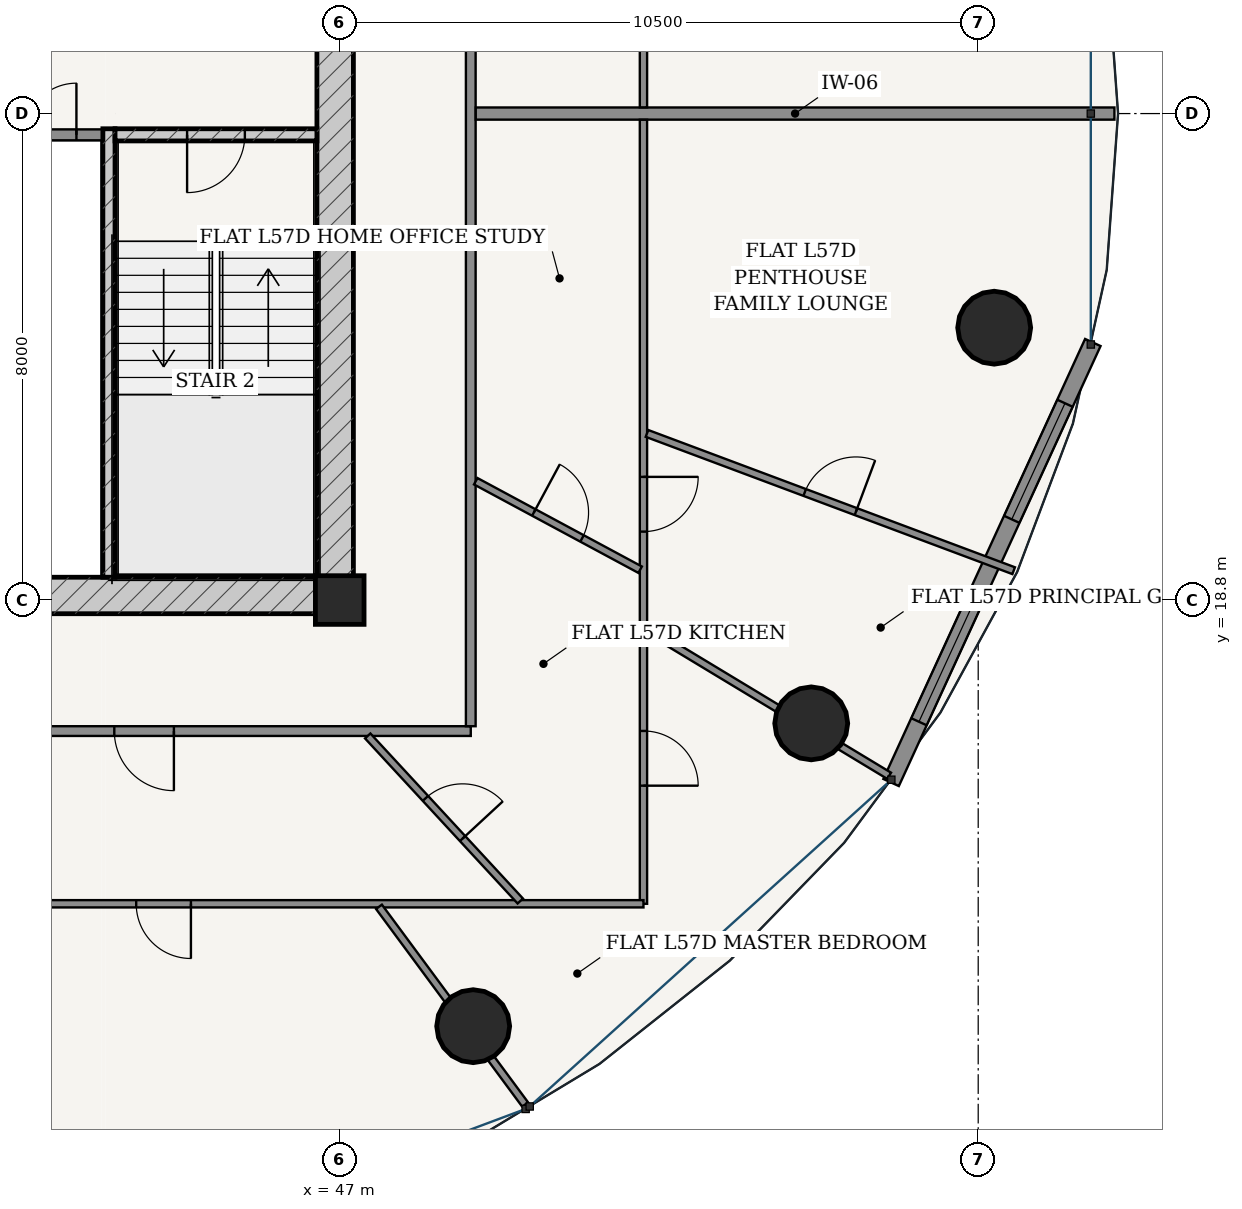
"""IFC4 building model, lengths in metres.
Left out: names, types, materials, properties, quantities, classifications, styles, units other than length and angle.
Written with IfcOpenShell. Run it as: python <this file> out.ifc"""

import sys

from ifc_helpers import new_model, si_unit, direction, frame, frame_2d, origin, origin_2d, place, context, subcontext, project, spatial, rectangle, hollow_circle, extrude, source, transform, mapped, element, fill, save


model = new_model("IFC4")
c1 = context("Model", 3, precision=1e-05, world=origin(), true_north=direction((-0.2419218956, 0.970295726276)))
c2 = subcontext(c1, "Body", "Model", "MODEL_VIEW")
j1 = project(units=[si_unit("LENGTHUNIT", "METRE"), si_unit("PLANEANGLEUNIT", "RADIAN")], contexts=[c1])
p1 = place(None, origin())
s1 = spatial("IfcSite", under=j1, at=p1, CompositionType="ELEMENT")
p2 = place(p1, origin())
s2 = spatial("IfcBuilding", under=s1, at=p2, CompositionType="ELEMENT")
p3 = place(p2, frame((0.0, 0.0, 217.1)))
s3 = spatial("IfcBuildingStorey", under=s2, at=p3, CompositionType="ELEMENT", Elevation=217.1)
p4 = place(p3, frame((47.0, 18.8, 0.0), z_axis=(0.0, 0.0, 1.0), x_axis=(1.0, 0.0, 0.0)))
e1 = element("IfcColumn", 1, at=p4, inside=s3, PredefinedType="COLUMN", context=c2, shape_type="SweptSolid", body=[
    extrude(rectangle(XDim=0.8, YDim=0.8, at=origin_2d()), origin(), (0.0, 0.0, 1.0), 3.7),
])
p5 = place(p3, frame((28.775, 18.875, 0.0), z_axis=(0.0, 0.0, 1.0), x_axis=(1.0, 0.0, 0.0)))
e2 = element("IfcWall", 2, at=p5, inside=s3, PredefinedType="SHEAR", context=c2, shape_type="SweptSolid", body=[
    extrude(rectangle(XDim=18.45, YDim=0.6, at=frame_2d((9.225, 0.0))), origin(), (0.0, 0.0, 1.0), 3.435),
])
p6 = place(p5, frame((7.46, 0.0, 0.0)))
e3 = element("IfcOpeningElement", 3, at=p6, cuts=e2, PredefinedType="OPENING", context=c2, shape_type="SweptSolid", body=[
    extrude(rectangle(XDim=0.85, YDim=2.1, at=frame_2d((0.425, 1.05))), frame((0.0, 0.31, 0.0), z_axis=(0.0, -1.0, 0.0), x_axis=(1.0, 0.0, 0.0)), (0.0, 0.0, 1.0), 0.62),
])
p7 = place(p5, frame((10.54, 0.0, 0.0)))
e4 = element("IfcOpeningElement", 4, at=p7, cuts=e2, PredefinedType="OPENING", context=c2, shape_type="SweptSolid", body=[
    extrude(rectangle(XDim=0.85, YDim=2.1, at=frame_2d((0.425, 1.05))), frame((0.0, 0.31, 0.0), z_axis=(0.0, -1.0, 0.0), x_axis=(1.0, 0.0, 0.0)), (0.0, 0.0, 1.0), 0.62),
])
p8 = place(p3, frame((46.925, 19.175, 0.0), z_axis=(0.0, 0.0, 1.0), x_axis=(0.0, 1.0, 0.0)))
e5 = element("IfcWall", 5, at=p8, inside=s3, PredefinedType="SHEAR", context=c2, shape_type="SweptSolid", body=[
    extrude(rectangle(XDim=15.25, YDim=0.6, at=frame_2d((7.625, 0.0))), origin(), (0.0, 0.0, 1.0), 3.435),
])
p9 = place(p8, frame((9.875, 0.0, 0.0)))
e6 = element("IfcOpeningElement", 6, at=p9, cuts=e5, PredefinedType="OPENING", context=c2, shape_type="SweptSolid", body=[
    extrude(rectangle(XDim=1.5, YDim=2.2, at=frame_2d((0.75, 1.1))), frame((0.0, 0.31, 0.0), z_axis=(0.0, -1.0, 0.0), x_axis=(1.0, 0.0, 0.0)), (0.0, 0.0, 1.0), 0.62),
])
p10 = place(p3, frame((43.205, 19.175, 0.0), z_axis=(0.0, 0.0, 1.0), x_axis=(0.0, 1.0, 0.0)))
e7 = element("IfcWall", 7, at=p10, inside=s3, PredefinedType="SOLIDWALL", context=c2, shape_type="SweptSolid", body=[
    extrude(rectangle(XDim=7.375, YDim=0.2, at=frame_2d((3.688, 0.0))), origin(), (0.0, 0.0, 1.0), 3.435),
])
p11 = place(p3, frame((43.305, 26.45, 0.0), z_axis=(0.0, 0.0, 1.0), x_axis=(1.0, 0.0, 0.0)))
e8 = element("IfcWall", 8, at=p11, inside=s3, PredefinedType="SOLIDWALL", context=c2, shape_type="SweptSolid", body=[
    extrude(rectangle(XDim=3.32, YDim=0.2, at=frame_2d((1.66, 0.0))), origin(), (0.0, 0.0, 1.0), 3.435),
])
p12 = place(p11, frame((1.185, 0.0, 0.0)))
e9 = element("IfcOpeningElement", 9, at=p12, cuts=e8, PredefinedType="OPENING", context=c2, shape_type="SweptSolid", body=[
    extrude(rectangle(XDim=0.95, YDim=2.15, at=frame_2d((0.475, 1.075))), frame((0.0, 0.11, 0.0), z_axis=(0.0, -1.0, 0.0), x_axis=(1.0, 0.0, 0.0)), (0.0, 0.0, 1.0), 0.22),
])
for number, where, z_axis, x_axis in (
    (10, (49.195, 11.792, 0.0), (0.0, 0.0, 1.0), (1.0, 0.0, 0.0)),
    (11, (54.754, 16.772, 0.0), (0.0, 0.0, 1.0), (1.0, 0.0, 0.0)),
    (12, (57.763, 23.279, 0.0), (0.0, 0.0, 1.0), (1.0, 0.0, 0.0)),
):
    element("IfcColumn", number, at=place(p3, frame(where, z_axis=z_axis, x_axis=x_axis)), inside=s3, PredefinedType="COLUMN", context=c2, shape_type="SweptSolid", body=[
        extrude(hollow_circle(Radius=0.6, WallThickness=0.038, at=origin_2d()), origin(), (0.0, 0.0, 1.0), 3.7),
    ])
p13 = place(p3, frame((56.068, 15.799, 0.0), z_axis=(0.0, 0.0, 1.0), x_axis=(0.416717018135, 0.909036262641, 0.0)))
e13 = element("IfcWall", 13, at=p13, inside=s3, PredefinedType="SOLIDWALL", context=c2, shape_type="SweptSolid", body=[
    extrude(rectangle(XDim=7.96, YDim=0.28, at=frame_2d((3.98, 0.0))), origin(), (0.0, 0.0, 1.0), 3.435),
])
p14 = place(p13, frame((1.099, 0.0, 0.85)))
e14 = element("IfcOpeningElement", 14, at=p14, cuts=e13, PredefinedType="OPENING", context=c2, shape_type="SweptSolid", body=[
    extrude(rectangle(XDim=2.1, YDim=1.95, at=frame_2d((1.05, 0.975))), frame((0.0, 0.15, 0.0), z_axis=(0.0, -1.0, 0.0), x_axis=(1.0, 0.0, 0.0)), (0.0, 0.0, 1.0), 0.3),
])
p15 = place(p13, frame((4.761, 0.0, 0.85)))
e15 = element("IfcOpeningElement", 15, at=p15, cuts=e13, PredefinedType="OPENING", context=c2, shape_type="SweptSolid", body=[
    extrude(rectangle(XDim=2.1, YDim=1.95, at=frame_2d((1.05, 0.975))), frame((0.0, 0.15, 0.0), z_axis=(0.0, -1.0, 0.0), x_axis=(1.0, 0.0, 0.0)), (0.0, 0.0, 1.0), 0.3),
])
p16 = place(p3, frame((41.39, 26.45, 0.0), z_axis=(0.0, 0.0, 1.0), x_axis=(1.0, 0.0, 0.0)))
e16 = element("IfcWall", 16, at=p16, inside=s3, PredefinedType="PARTITIONING", context=c2, shape_type="SweptSolid", body=[
    extrude(rectangle(XDim=1.71, YDim=0.18, at=frame_2d((0.855, 0.0))), origin(), (0.0, 0.0, 1.0), 3.435),
])
p17 = place(p16, frame((0.43, 0.0, 0.0)))
e17 = element("IfcOpeningElement", 17, at=p17, cuts=e16, PredefinedType="OPENING", context=c2, shape_type="SweptSolid", body=[
    extrude(rectangle(XDim=0.85, YDim=2.1, at=frame_2d((0.425, 1.05))), frame((0.0, 0.1, 0.0), z_axis=(0.0, -1.0, 0.0), x_axis=(1.0, 0.0, 0.0)), (0.0, 0.0, 1.0), 0.2),
])
p18 = place(p3, frame((34.32, 16.645, 0.0), z_axis=(0.0, 0.0, 1.0), x_axis=(1.0, 0.0, 0.0)))
e18 = element("IfcWall", 18, at=p18, inside=s3, PredefinedType="PARTITIONING", context=c2, shape_type="SweptSolid", body=[
    extrude(rectangle(XDim=14.835, YDim=0.16, at=frame_2d((7.417, 0.0))), origin(), (0.0, 0.0, 1.0), 2.951),
])
p19 = place(p18, frame((8.973, 0.0, 0.0)))
e19 = element("IfcOpeningElement", 19, at=p19, cuts=e18, PredefinedType="OPENING", context=c2, shape_type="SweptSolid", body=[
    extrude(rectangle(XDim=0.98, YDim=2.2, at=frame_2d((0.49, 1.1))), frame((0.0, 0.09, 0.0), z_axis=(0.0, -1.0, 0.0), x_axis=(1.0, 0.0, 0.0)), (0.0, 0.0, 1.0), 0.18),
])
p20 = place(p3, frame((49.155, 16.725, 0.0), z_axis=(0.0, 0.0, 1.0), x_axis=(0.0, 1.0, 0.0)))
e20 = element("IfcWall", 20, at=p20, inside=s3, PredefinedType="PARTITIONING", context=c2, shape_type="SweptSolid", body=[
    extrude(rectangle(XDim=18.3, YDim=0.16, at=frame_2d((9.15, 0.0))), origin(), (0.0, 0.0, 1.0), 2.951),
])
p21 = place(p20, frame((15.837, 0.0, 0.0)))
e21 = element("IfcOpeningElement", 21, at=p21, cuts=e20, PredefinedType="OPENING", context=c2, shape_type="SweptSolid", body=[
    extrude(rectangle(XDim=0.98, YDim=2.2, at=frame_2d((0.49, 1.1))), frame((0.0, 0.09, 0.0), z_axis=(0.0, -1.0, 0.0), x_axis=(1.0, 0.0, 0.0)), (0.0, 0.0, 1.0), 0.18),
])
p22 = place(p3, frame((49.237, 26.8, 0.0), z_axis=(0.0, 0.0, 1.0), x_axis=(1.0, 0.0, 0.0)))
e22 = element("IfcWall", 22, at=p22, inside=s3, PredefinedType="PARTITIONING", context=c2, shape_type="SweptSolid", body=[
    extrude(rectangle(XDim=10.503, YDim=0.2, at=frame_2d((5.251, 0.0))), origin(), (0.0, 0.0, 1.0), 2.951),
])
p23 = place(p3, frame((51.995, 37.945, 0.0), z_axis=(0.0, 0.0, 1.0), x_axis=(0.0, -1.0, 0.0)))
e23 = element("IfcWall", 23, at=p23, inside=s3, PredefinedType="PARTITIONING", context=c2, shape_type="SweptSolid", body=[
    extrude(rectangle(XDim=11.043, YDim=0.12, at=frame_2d((5.521, 0.0))), origin(), (0.0, 0.0, 1.0), 2.951),
])
p24 = place(p23, frame((2.46, 0.0, 0.0)))
e24 = element("IfcOpeningElement", 24, at=p24, cuts=e23, PredefinedType="OPENING", context=c2, shape_type="SweptSolid", body=[
    extrude(rectangle(XDim=0.9, YDim=2.15, at=frame_2d((0.45, 1.075))), frame((0.0, 0.07, 0.0), z_axis=(0.0, -1.0, 0.0), x_axis=(1.0, 0.0, 0.0)), (0.0, 0.0, 1.0), 0.14),
])
p25 = place(p3, frame((51.995, 26.698, 0.0), z_axis=(0.0, 0.0, 1.0), x_axis=(0.0, -1.0, 0.0)))
e25 = element("IfcWall", 25, at=p25, inside=s3, PredefinedType="PARTITIONING", context=c2, shape_type="SweptSolid", body=[
    extrude(rectangle(XDim=12.893, YDim=0.12, at=frame_2d((6.447, 0.0))), origin(), (0.0, 0.0, 1.0), 2.951),
])
p26 = place(p25, frame((10.051, 0.0, 0.0)))
e26 = element("IfcOpeningElement", 26, at=p26, cuts=e25, PredefinedType="OPENING", context=c2, shape_type="SweptSolid", body=[
    extrude(rectangle(XDim=0.9, YDim=2.15, at=frame_2d((0.45, 1.075))), frame((0.0, 0.07, 0.0), z_axis=(0.0, -1.0, 0.0), x_axis=(1.0, 0.0, 0.0)), (0.0, 0.0, 1.0), 0.14),
])
p27 = place(p25, frame((5.873, 0.0, 0.0)))
e27 = element("IfcOpeningElement", 27, at=p27, cuts=e25, PredefinedType="OPENING", context=c2, shape_type="SweptSolid", body=[
    extrude(rectangle(XDim=0.9, YDim=2.15, at=frame_2d((0.45, 1.075))), frame((0.0, 0.07, 0.0), z_axis=(0.0, -1.0, 0.0), x_axis=(1.0, 0.0, 0.0)), (0.0, 0.0, 1.0), 0.14),
])
p28 = place(p3, frame((51.995, 13.805, 0.0), z_axis=(0.0, 0.0, 1.0), x_axis=(-1.0, 0.0, 0.0)))
e28 = element("IfcWall", 28, at=p28, inside=s3, PredefinedType="PARTITIONING", context=c2, shape_type="SweptSolid", body=[
    extrude(rectangle(XDim=16.753, YDim=0.12, at=frame_2d((8.377, 0.0))), origin(), (0.0, 0.0, 1.0), 2.951),
])
p29 = place(p28, frame((7.442, 0.0, 0.0)))
e29 = element("IfcOpeningElement", 29, at=p29, cuts=e28, PredefinedType="OPENING", context=c2, shape_type="SweptSolid", body=[
    extrude(rectangle(XDim=0.9, YDim=2.15, at=frame_2d((0.45, 1.075))), frame((0.0, 0.07, 0.0), z_axis=(0.0, -1.0, 0.0), x_axis=(1.0, 0.0, 0.0)), (0.0, 0.0, 1.0), 0.14),
])
p30 = place(p3, frame((47.646, 13.755, 0.0), z_axis=(0.0, 0.0, 1.0), x_axis=(0.594518373783, -0.80408202519, 0.0)))
e30 = element("IfcWall", 30, at=p30, inside=s3, PredefinedType="PARTITIONING", context=c2, shape_type="SweptSolid", body=[
    extrude(rectangle(XDim=4.044, YDim=0.12, at=frame_2d((2.022, 0.0))), origin(), (0.0, 0.0, 1.0), 2.951),
])
p31 = place(p3, frame((52.048, 18.318, 0.0), z_axis=(0.0, 0.0, 1.0), x_axis=(0.856051317976, -0.516890840499, 0.0)))
e31 = element("IfcWall", 31, at=p31, inside=s3, PredefinedType="PARTITIONING", context=c2, shape_type="SweptSolid", body=[
    extrude(rectangle(XDim=4.658, YDim=0.12, at=frame_2d((2.329, 0.0))), origin(), (0.0, 0.0, 1.0), 2.951),
])
p32 = place(p3, frame((52.053, 21.54, 0.0), z_axis=(0.0, 0.0, 1.0), x_axis=(0.936534700322, -0.350574892274, 0.0)))
e32 = element("IfcWall", 32, at=p32, inside=s3, PredefinedType="PARTITIONING", context=c2, shape_type="SweptSolid", body=[
    extrude(rectangle(XDim=6.439, YDim=0.12, at=frame_2d((3.219, 0.0))), origin(), (0.0, 0.0, 1.0), 2.951),
])
p33 = place(p32, frame((2.769, 0.0, 0.0)))
e33 = element("IfcOpeningElement", 33, at=p33, cuts=e32, PredefinedType="OPENING", context=c2, shape_type="SweptSolid", body=[
    extrude(rectangle(XDim=0.9, YDim=2.15, at=frame_2d((0.45, 1.075))), frame((0.0, 0.07, 0.0), z_axis=(0.0, -1.0, 0.0), x_axis=(1.0, 0.0, 0.0)), (0.0, 0.0, 1.0), 0.14),
])
p34 = place(p3, frame((47.46, 16.565, 0.0), z_axis=(0.0, 0.0, 1.0), x_axis=(0.678787443458, -0.734334805524, 0.0)))
e34 = element("IfcWall", 34, at=p34, inside=s3, PredefinedType="PARTITIONING", context=c2, shape_type="SweptSolid", body=[
    extrude(rectangle(XDim=3.696, YDim=0.12, at=frame_2d((1.848, 0.0))), origin(), (0.0, 0.0, 1.0), 2.951),
])
p35 = place(p34, frame((1.398, 0.0, 0.0)))
e35 = element("IfcOpeningElement", 35, at=p35, cuts=e34, PredefinedType="OPENING", context=c2, shape_type="SweptSolid", body=[
    extrude(rectangle(XDim=0.9, YDim=2.15, at=frame_2d((0.45, 1.075))), frame((0.0, 0.07, 0.0), z_axis=(0.0, -1.0, 0.0), x_axis=(1.0, 0.0, 0.0)), (0.0, 0.0, 1.0), 0.14),
])
p36 = place(p3, frame((49.237, 20.753, 0.0), z_axis=(0.0, 0.0, 1.0), x_axis=(0.880601289356, -0.473857963091, 0.0)))
e36 = element("IfcWall", 36, at=p36, inside=s3, PredefinedType="PARTITIONING", context=c2, shape_type="SweptSolid", body=[
    extrude(rectangle(XDim=3.07, YDim=0.12, at=frame_2d((1.535, 0.0))), origin(), (0.0, 0.0, 1.0), 3.11),
])
p37 = place(p36, frame((1.085, 0.0, 0.0)))
e37 = element("IfcOpeningElement", 37, at=p37, cuts=e36, PredefinedType="OPENING", context=c2, shape_type="SweptSolid", body=[
    extrude(rectangle(XDim=0.9, YDim=2.15, at=frame_2d((0.45, 1.075))), frame((0.0, 0.07, 0.0), z_axis=(0.0, -1.0, 0.0), x_axis=(1.0, 0.0, 0.0)), (0.0, 0.0, 1.0), 0.14),
])
m1 = source(origin(), c2, "Body", "SweptSolid", [
    extrude(rectangle(XDim=2.1, YDim=1.95, at=frame_2d((1.05, 0.975))), frame((0.0, 0.03, 0.0), z_axis=(0.0, -1.0, 0.0), x_axis=(1.0, 0.0, 0.0)), (0.0, 0.0, 1.0), 0.06),
])
p38 = place(p14, origin())
e38 = element("IfcWindow", 38, at=p38, inside=s3, PartitioningType="SINGLE_PANEL", PredefinedType="WINDOW", context=c2, shape_type="MappedRepresentation", body=[
    mapped(m1, transform((0.0, 0.0, 0.0), scale=1.0)),
])
fill(e14, e38)
p39 = place(p15, origin())
e39 = element("IfcWindow", 39, at=p39, inside=s3, PartitioningType="SINGLE_PANEL", PredefinedType="WINDOW", context=c2, shape_type="MappedRepresentation", body=[
    mapped(m1, transform((0.0, 0.0, 0.0), scale=1.0)),
])
fill(e15, e39)
m2 = source(origin(), c2, "Body", "SweptSolid", [
    extrude(rectangle(XDim=0.95, YDim=2.15, at=frame_2d((0.475, 1.075))), frame((0.0, 0.025, 0.0), z_axis=(0.0, -1.0, 0.0), x_axis=(1.0, 0.0, 0.0)), (0.0, 0.0, 1.0), 0.05),
])
p40 = place(p12, frame((0.95, 0.0, 0.0), z_axis=(0.0, 0.0, 1.0), x_axis=(-1.0, 0.0, 0.0)))
e40 = element("IfcDoor", 40, at=p40, inside=s3, OperationType="SINGLE_SWING_RIGHT", PredefinedType="DOOR", context=c2, shape_type="MappedRepresentation", body=[
    mapped(m2, transform((0.0, 0.0, 0.0), scale=1.0)),
])
fill(e9, e40)
m3 = source(origin(), c2, "Body", "SweptSolid", [
    extrude(rectangle(XDim=0.85, YDim=2.1, at=frame_2d((0.425, 1.05))), frame((0.0, 0.025, 0.0), z_axis=(0.0, -1.0, 0.0), x_axis=(1.0, 0.0, 0.0)), (0.0, 0.0, 1.0), 0.05),
])
p41 = place(p17, origin())
e41 = element("IfcDoor", 41, at=p41, inside=s3, OperationType="SINGLE_SWING_RIGHT", PredefinedType="DOOR", context=c2, shape_type="MappedRepresentation", body=[
    mapped(m3, transform((0.0, 0.0, 0.0), scale=1.0)),
])
fill(e17, e41)
m4 = source(origin(), c2, "Body", "SweptSolid", [
    extrude(rectangle(XDim=0.98, YDim=2.2, at=frame_2d((0.49, 1.1))), frame((0.0, 0.025, 0.0), z_axis=(0.0, -1.0, 0.0), x_axis=(1.0, 0.0, 0.0)), (0.0, 0.0, 1.0), 0.05),
])
p42 = place(p19, frame((0.98, 0.0, 0.0), z_axis=(0.0, 0.0, 1.0), x_axis=(-1.0, 0.0, 0.0)))
e42 = element("IfcDoor", 42, at=p42, inside=s3, OperationType="SINGLE_SWING_LEFT", PredefinedType="DOOR", context=c2, shape_type="MappedRepresentation", body=[
    mapped(m4, transform((0.0, 0.0, 0.0), scale=1.0)),
])
fill(e19, e42)
m5 = source(origin(), c2, "Body", "SweptSolid", [
    extrude(rectangle(XDim=0.9, YDim=2.15, at=frame_2d((0.45, 1.075))), frame((0.0, 0.025, 0.0), z_axis=(0.0, -1.0, 0.0), x_axis=(1.0, 0.0, 0.0)), (0.0, 0.0, 1.0), 0.05),
])
p43 = place(p29, origin())
e43 = element("IfcDoor", 43, at=p43, inside=s3, OperationType="SINGLE_SWING_LEFT", PredefinedType="DOOR", context=c2, shape_type="MappedRepresentation", body=[
    mapped(m5, transform((0.0, 0.0, 0.0), scale=1.0)),
])
fill(e29, e43)
p44 = place(p35, origin())
e44 = element("IfcDoor", 44, at=p44, inside=s3, OperationType="SINGLE_SWING_RIGHT", PredefinedType="DOOR", context=c2, shape_type="MappedRepresentation", body=[
    mapped(m5, transform((0.0, 0.0, 0.0), scale=1.0)),
])
fill(e35, e44)
p45 = place(p37, origin())
e45 = element("IfcDoor", 45, at=p45, inside=s3, OperationType="SINGLE_SWING_LEFT", PredefinedType="DOOR", context=c2, shape_type="MappedRepresentation", body=[
    mapped(m5, transform((0.0, 0.0, 0.0), scale=1.0)),
])
fill(e37, e45)
p46 = place(p26, origin())
e46 = element("IfcDoor", 46, at=p46, inside=s3, OperationType="SINGLE_SWING_RIGHT", PredefinedType="DOOR", context=c2, shape_type="MappedRepresentation", body=[
    mapped(m5, transform((0.0, 0.0, 0.0), scale=1.0)),
])
fill(e26, e46)
p47 = place(p27, origin())
e47 = element("IfcDoor", 47, at=p47, inside=s3, OperationType="SINGLE_SWING_LEFT", PredefinedType="DOOR", context=c2, shape_type="MappedRepresentation", body=[
    mapped(m5, transform((0.0, 0.0, 0.0), scale=1.0)),
])
fill(e27, e47)
p48 = place(p33, origin())
e48 = element("IfcDoor", 48, at=p48, inside=s3, OperationType="SINGLE_SWING_RIGHT", PredefinedType="DOOR", context=c2, shape_type="MappedRepresentation", body=[
    mapped(m5, transform((0.0, 0.0, 0.0), scale=1.0)),
])
fill(e33, e48)
save(model, sys.argv[1])
